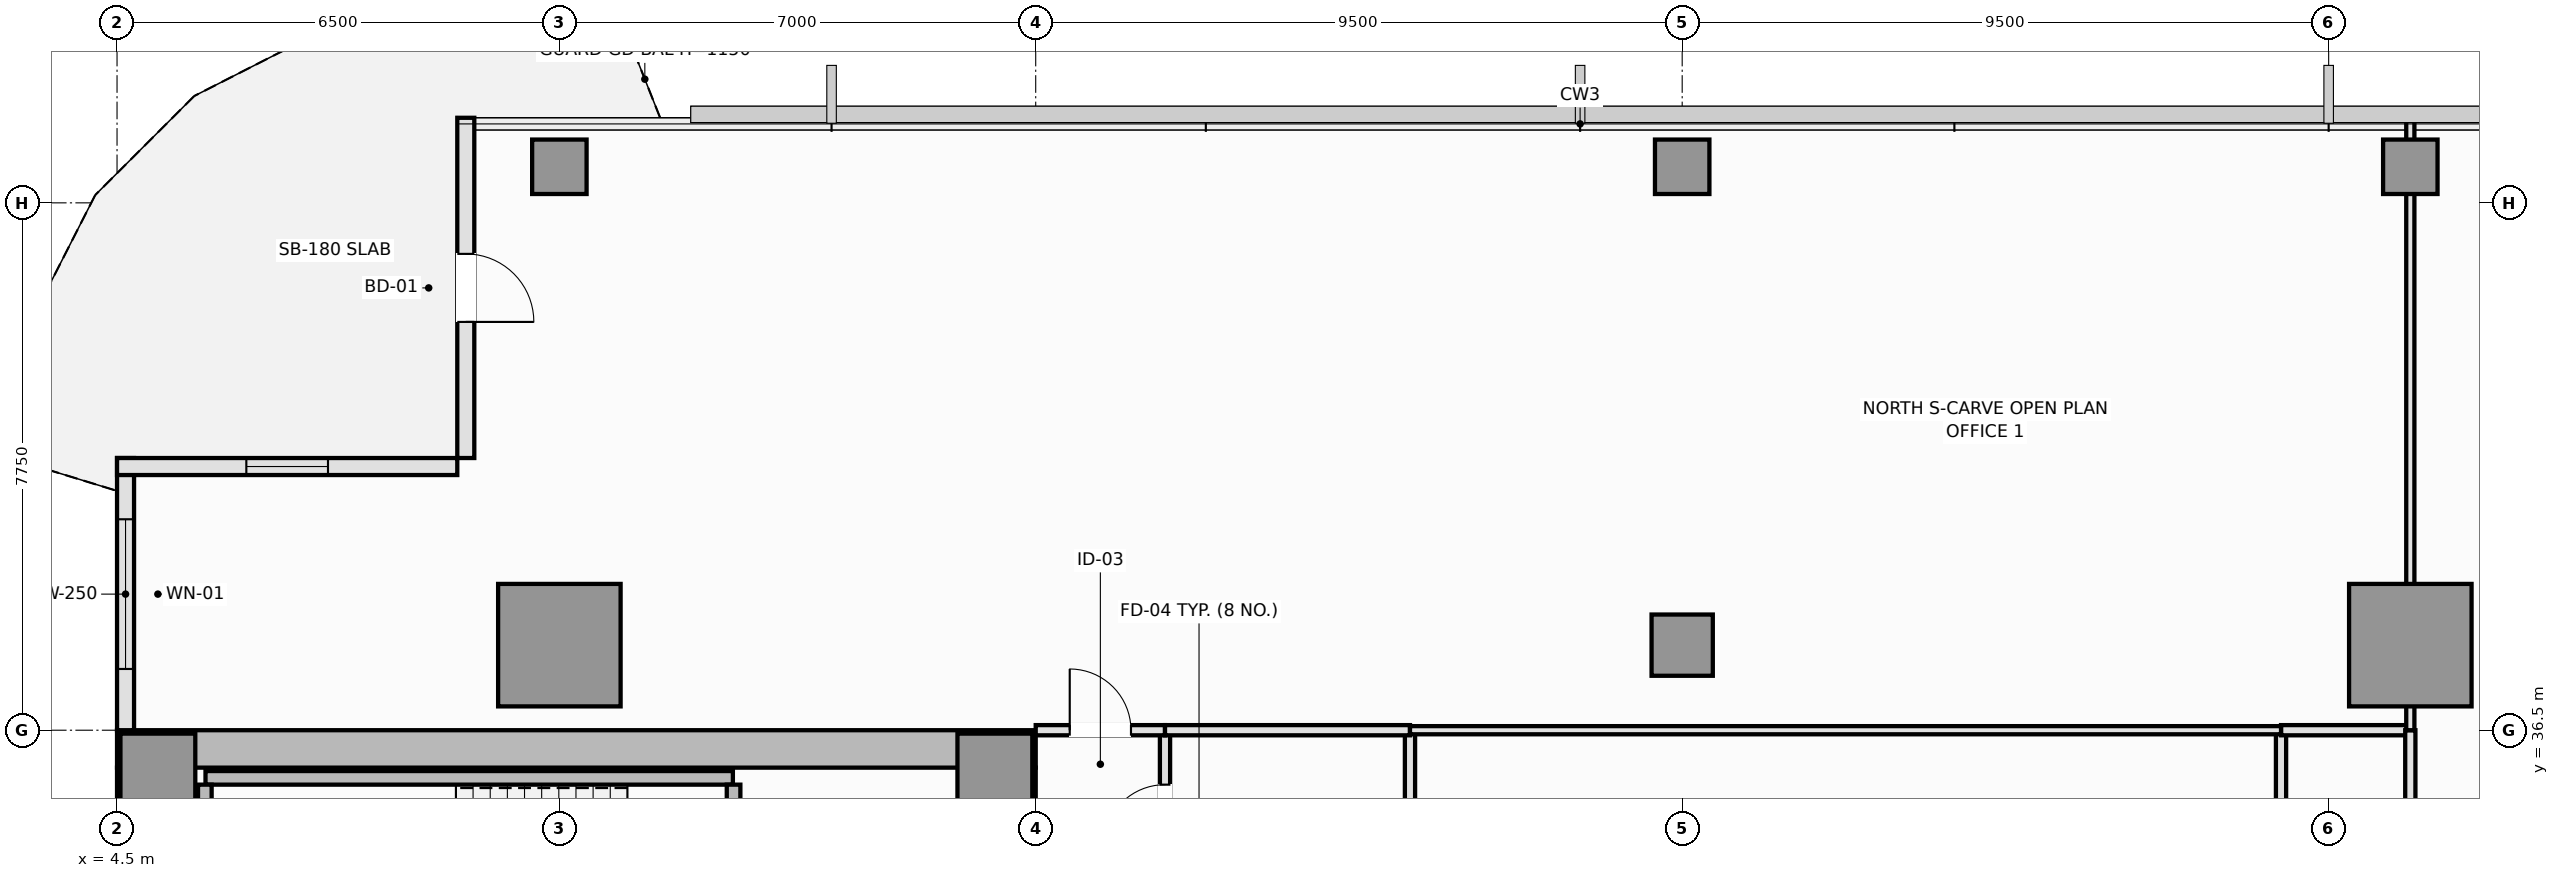
"""IFC4 building model, lengths in metres.
Left out: names, types, materials, properties, quantities, classifications, styles, units other than length and angle.
Written with IfcOpenShell. Run it as: python <this file> out.ifc"""

import sys

from ifc_helpers import new_model, si_unit, direction, frame, frame_2d, origin, origin_2d, place, context, subcontext, project, spatial, rectangle, extrude, element, fill, save


model = new_model("IFC4")
c1 = context("Model", 3, precision=1e-05, world=origin(), true_north=direction((0.0, 1.0)))
c2 = subcontext(c1, "Body", "Model", "MODEL_VIEW")
j1 = project(units=[si_unit("LENGTHUNIT", "METRE"), si_unit("PLANEANGLEUNIT", "RADIAN")], contexts=[c1])
p1 = place(None, origin())
s1 = spatial("IfcSite", under=j1, at=p1, CompositionType="ELEMENT")
p2 = place(p1, origin())
s2 = spatial("IfcBuilding", under=s1, at=p2, CompositionType="ELEMENT")
p3 = place(p2, frame((0.0, 0.0, 223.55)))
s3 = spatial("IfcBuildingStorey", under=s2, at=p3, CompositionType="ELEMENT", Elevation=223.55)
p4 = place(p3, frame((4.5, 36.225, 0.0), z_axis=(0.0, 0.0, 1.0), x_axis=(1.0, 0.0, 0.0)))
e1 = element("IfcWall", 1, at=p4, inside=s3, PredefinedType="SHEAR", context=c2, shape_type="SweptSolid", body=[
    extrude(rectangle(XDim=13.5, YDim=0.55, at=frame_2d((6.75, 0.0))), origin(), (0.0, 0.0, 1.0), 3.55),
])
p5 = place(p3, frame((4.775, 14.55, 0.0), z_axis=(0.0, 0.0, 1.0), x_axis=(0.0, 1.0, 0.0)))
e2 = element("IfcWall", 2, at=p5, inside=s3, PredefinedType="SHEAR", context=c2, shape_type="SweptSolid", body=[
    extrude(rectangle(XDim=21.4, YDim=0.55, at=frame_2d((10.7, 0.0))), origin(), (0.0, 0.0, 1.0), 3.55),
])
p6 = place(p3, frame((17.725, 27.05, 0.0), z_axis=(0.0, 0.0, 1.0), x_axis=(0.0, 1.0, 0.0)))
e3 = element("IfcWall", 3, at=p6, inside=s3, PredefinedType="SHEAR", context=c2, shape_type="SweptSolid", body=[
    extrude(rectangle(XDim=8.9, YDim=0.55, at=frame_2d((4.45, 0.0))), origin(), (0.0, 0.0, 1.0), 3.55),
])
p7 = place(p6, frame((3.45, 0.0, 0.0)))
e4 = element("IfcOpeningElement", 4, at=p7, cuts=e3, PredefinedType="OPENING", context=c2, shape_type="SweptSolid", body=[
    extrude(rectangle(XDim=1.1, YDim=2.15, at=frame_2d((0.55, 1.075))), frame((0.0, 0.285, 0.0), z_axis=(0.0, -1.0, 0.0), x_axis=(1.0, 0.0, 0.0)), (0.0, 0.0, 1.0), 0.57),
])
for number, where, z_axis, x_axis in (
    (5, (5.1, 35.9, 0.0), (0.0, 0.0, 1.0), (1.0, 0.0, 0.0)),
    (6, (17.4, 35.9, 0.0), (0.0, 0.0, 1.0), (1.0, 0.0, 0.0)),
):
    element("IfcColumn", number, at=place(p3, frame(where, z_axis=z_axis, x_axis=x_axis)), inside=s3, PredefinedType="PILASTER", context=c2, shape_type="SweptSolid", body=[
        extrude(rectangle(XDim=1.1, YDim=1.1, at=origin_2d()), origin(), (0.0, 0.0, 1.0), 3.55),
    ])
for number, where, z_axis, x_axis in (
    (7, (11.0, 37.75, 0.0), (0.0, 0.0, 1.0), (1.0, 0.0, 0.0)),
    (8, (38.2, 37.75, 0.0), (0.0, 0.0, 1.0), (1.0, 0.0, 0.0)),
):
    element("IfcColumn", number, at=place(p3, frame(where, z_axis=z_axis, x_axis=x_axis)), inside=s3, PredefinedType="COLUMN", context=c2, shape_type="SweptSolid", body=[
        extrude(rectangle(XDim=1.8, YDim=1.8, at=origin_2d()), origin(), (0.0, 0.0, 1.0), 3.55),
    ])
p8 = place(p3, frame((27.5, 37.75, 0.0), z_axis=(0.0, 0.0, 1.0), x_axis=(1.0, 0.0, 0.0)))
e9 = element("IfcColumn", 9, at=p8, inside=s3, PredefinedType="COLUMN", context=c2, shape_type="SweptSolid", body=[
    extrude(rectangle(XDim=0.9, YDim=0.9, at=origin_2d()), origin(), (0.0, 0.0, 1.0), 3.55),
])
for number, where, z_axis, x_axis in (
    (10, (11.0, 44.78, 0.0), (0.0, 0.0, 1.0), (1.0, 0.0, 0.0)),
    (11, (27.5, 44.78, 0.0), (0.0, 0.0, 1.0), (1.0, 0.0, 0.0)),
    (12, (38.2, 44.78, 0.0), (0.0, 0.0, 1.0), (1.0, 0.0, 0.0)),
):
    element("IfcColumn", number, at=place(p3, frame(where, z_axis=z_axis, x_axis=x_axis)), inside=s3, PredefinedType="COLUMN", context=c2, shape_type="SweptSolid", body=[
        extrude(rectangle(XDim=0.8, YDim=0.8, at=origin_2d()), origin(), (0.0, 0.0, 1.0), 3.55),
    ])
p9 = place(p3, frame((4.625, 40.5, 0.0), z_axis=(0.0, 0.0, 1.0), x_axis=(0.0, -1.0, 0.0)))
e13 = element("IfcWall", 13, at=p9, inside=s3, PredefinedType="SOLIDWALL", context=c2, shape_type="SweptSolid", body=[
    extrude(rectangle(XDim=4.0, YDim=0.25, at=frame_2d((2.0, 0.0))), origin(), (0.0, 0.0, 1.0), 3.37),
])
p10 = place(p9, frame((0.9, 0.0, 0.9)))
e14 = element("IfcOpeningElement", 14, at=p10, cuts=e13, PredefinedType="OPENING", context=c2, shape_type="SweptSolid", body=[
    extrude(rectangle(XDim=2.2, YDim=1.8, at=frame_2d((1.1, 0.9))), frame((0.0, 0.135, 0.0), z_axis=(0.0, -1.0, 0.0), x_axis=(1.0, 0.0, 0.0)), (0.0, 0.0, 1.0), 0.27),
])
p11 = place(p3, frame((9.625, 45.5, 0.0), z_axis=(0.0, 0.0, 1.0), x_axis=(0.0, -1.0, 0.0)))
e15 = element("IfcWall", 15, at=p11, inside=s3, PredefinedType="SOLIDWALL", context=c2, shape_type="SweptSolid", body=[
    extrude(rectangle(XDim=5.0, YDim=0.25, at=frame_2d((2.5, 0.0))), origin(), (0.0, 0.0, 1.0), 3.1),
])
p12 = place(p11, frame((2.0, 0.0, 0.0)))
e16 = element("IfcOpeningElement", 16, at=p12, cuts=e15, PredefinedType="OPENING", context=c2, shape_type="SweptSolid", body=[
    extrude(rectangle(XDim=1.0, YDim=2.2, at=frame_2d((0.5, 1.1))), frame((0.0, 0.135, 0.0), z_axis=(0.0, -1.0, 0.0), x_axis=(1.0, 0.0, 0.0)), (0.0, 0.0, 1.0), 0.27),
])
p13 = place(p3, frame((9.5, 40.375, 0.0), z_axis=(0.0, 0.0, 1.0), x_axis=(-1.0, 0.0, 0.0)))
e17 = element("IfcWall", 17, at=p13, inside=s3, PredefinedType="SOLIDWALL", context=c2, shape_type="SweptSolid", body=[
    extrude(rectangle(XDim=5.0, YDim=0.25, at=frame_2d((2.5, 0.0))), origin(), (0.0, 0.0, 1.0), 3.37),
])
p14 = place(p13, frame((1.9, 0.0, 0.9)))
e18 = element("IfcOpeningElement", 18, at=p14, cuts=e17, PredefinedType="OPENING", context=c2, shape_type="SweptSolid", body=[
    extrude(rectangle(XDim=1.2, YDim=1.8, at=frame_2d((0.6, 0.9))), frame((0.0, 0.135, 0.0), z_axis=(0.0, -1.0, 0.0), x_axis=(1.0, 0.0, 0.0)), (0.0, 0.0, 1.0), 0.27),
])
p15 = place(p3, frame((5.8, 35.8, 0.0), z_axis=(0.0, 0.0, 1.0), x_axis=(1.0, 0.0, 0.0)))
e19 = element("IfcWall", 19, at=p15, inside=s3, PredefinedType="SOLIDWALL", context=c2, shape_type="SweptSolid", body=[
    extrude(rectangle(XDim=7.75, YDim=0.2, at=frame_2d((3.875, 0.0))), origin(), (0.0, 0.0, 1.0), 3.55),
])
p16 = place(p3, frame((5.79, 32.65, 0.0), z_axis=(0.0, 0.0, 1.0), x_axis=(0.0, 1.0, 0.0)))
e20 = element("IfcWall", 20, at=p16, inside=s3, PredefinedType="SOLIDWALL", context=c2, shape_type="SweptSolid", body=[
    extrude(rectangle(XDim=3.05, YDim=0.2, at=frame_2d((1.525, 0.0))), origin(), (0.0, 0.0, 1.0), 3.55),
])
p17 = place(p3, frame((13.56, 32.65, 0.0), z_axis=(0.0, 0.0, 1.0), x_axis=(0.0, 1.0, 0.0)))
e21 = element("IfcWall", 21, at=p17, inside=s3, PredefinedType="SOLIDWALL", context=c2, shape_type="SweptSolid", body=[
    extrude(rectangle(XDim=3.05, YDim=0.2, at=frame_2d((1.525, 0.0))), origin(), (0.0, 0.0, 1.0), 3.55),
])
p18 = place(p17, frame((0.95, 0.0, 0.0)))
e22 = element("IfcOpeningElement", 22, at=p18, cuts=e21, PredefinedType="OPENING", context=c2, shape_type="SweptSolid", body=[
    extrude(rectangle(XDim=1.15, YDim=2.15, at=frame_2d((0.575, 1.075))), frame((0.0, 0.11, 0.0), z_axis=(0.0, -1.0, 0.0), x_axis=(1.0, 0.0, 0.0)), (0.0, 0.0, 1.0), 0.22),
])
p19 = place(p3, frame((19.9, 34.0, 0.0), z_axis=(0.0, 0.0, 1.0), x_axis=(0.0, 1.0, 0.0)))
e23 = element("IfcWall", 23, at=p19, inside=s3, PredefinedType="PLUMBINGWALL", context=c2, shape_type="SweptSolid", body=[
    extrude(rectangle(XDim=2.5, YDim=0.15, at=frame_2d((1.25, 0.0))), origin(), (0.0, 0.0, 1.0), 3.37),
])
p20 = place(p19, frame((0.8, 0.0, 0.0)))
e24 = element("IfcOpeningElement", 24, at=p20, cuts=e23, PredefinedType="OPENING", context=c2, shape_type="SweptSolid", body=[
    extrude(rectangle(XDim=0.9, YDim=2.1, at=frame_2d((0.45, 1.05))), frame((0.0, 0.085, 0.0), z_axis=(0.0, -1.0, 0.0), x_axis=(1.0, 0.0, 0.0)), (0.0, 0.0, 1.0), 0.17),
])
p21 = place(p3, frame((18.0, 36.5, 0.0), z_axis=(0.0, 0.0, 1.0), x_axis=(1.0, 0.0, 0.0)))
e25 = element("IfcWall", 25, at=p21, inside=s3, PredefinedType="PARTITIONING", context=c2, shape_type="SweptSolid", body=[
    extrude(rectangle(XDim=1.9, YDim=0.15, at=frame_2d((0.95, 0.0))), origin(), (0.0, 0.0, 1.0), 3.37),
])
p22 = place(p21, frame((0.5, 0.0, 0.0)))
e26 = element("IfcOpeningElement", 26, at=p22, cuts=e25, PredefinedType="OPENING", context=c2, shape_type="SweptSolid", body=[
    extrude(rectangle(XDim=0.9, YDim=2.1, at=frame_2d((0.45, 1.05))), frame((0.0, 0.085, 0.0), z_axis=(0.0, -1.0, 0.0), x_axis=(1.0, 0.0, 0.0)), (0.0, 0.0, 1.0), 0.17),
])
p23 = place(p3, frame((36.3, 32.7, 0.0), z_axis=(0.0, 0.0, 1.0), x_axis=(0.0, 1.0, 0.0)))
e27 = element("IfcWall", 27, at=p23, inside=s3, PredefinedType="PARTITIONING", context=c2, shape_type="SweptSolid", body=[
    extrude(rectangle(XDim=3.8, YDim=0.15, at=frame_2d((1.9, 0.0))), origin(), (0.0, 0.0, 1.0), 3.37),
])
p24 = place(p23, frame((1.4, 0.0, 0.0)))
e28 = element("IfcOpeningElement", 28, at=p24, cuts=e27, PredefinedType="OPENING", context=c2, shape_type="SweptSolid", body=[
    extrude(rectangle(XDim=1.0, YDim=2.15, at=frame_2d((0.5, 1.075))), frame((0.0, 0.085, 0.0), z_axis=(0.0, -1.0, 0.0), x_axis=(1.0, 0.0, 0.0)), (0.0, 0.0, 1.0), 0.17),
])
p25 = place(p3, frame((36.3, 36.5, 0.0), z_axis=(0.0, 0.0, 1.0), x_axis=(1.0, 0.0, 0.0)))
e29 = element("IfcWall", 29, at=p25, inside=s3, PredefinedType="PARTITIONING", context=c2, shape_type="SweptSolid", body=[
    extrude(rectangle(XDim=1.9, YDim=0.15, at=frame_2d((0.95, 0.0))), origin(), (0.0, 0.0, 1.0), 3.37),
])
p26 = place(p3, frame((38.2, 28.9, 0.0), z_axis=(0.0, 0.0, 1.0), x_axis=(0.0, 1.0, 0.0)))
e30 = element("IfcWall", 30, at=p26, inside=s3, PredefinedType="PARTITIONING", context=c2, shape_type="SweptSolid", body=[
    extrude(rectangle(XDim=7.6, YDim=0.15, at=frame_2d((3.8, 0.0))), origin(), (0.0, 0.0, 1.0), 2.92),
])
p27 = place(p26, frame((3.894, 0.0, 0.0)))
e31 = element("IfcOpeningElement", 31, at=p27, cuts=e30, PredefinedType="OPENING", context=c2, shape_type="SweptSolid", body=[
    extrude(rectangle(XDim=1.0, YDim=2.15, at=frame_2d((0.5, 1.075))), frame((0.0, 0.085, 0.0), z_axis=(0.0, -1.0, 0.0), x_axis=(1.0, 0.0, 0.0)), (0.0, 0.0, 1.0), 0.17),
])
p28 = place(p3, frame((23.5, 34.0, 0.0), z_axis=(0.0, 0.0, 1.0), x_axis=(0.0, 1.0, 0.0)))
e32 = element("IfcWall", 32, at=p28, inside=s3, PredefinedType="PLUMBINGWALL", context=c2, shape_type="SweptSolid", body=[
    extrude(rectangle(XDim=2.5, YDim=0.15, at=frame_2d((1.25, 0.0))), origin(), (0.0, 0.0, 1.0), 3.37),
])
p29 = place(p3, frame((19.9, 36.5, 0.0), z_axis=(0.0, 0.0, 1.0), x_axis=(1.0, 0.0, 0.0)))
e33 = element("IfcWall", 33, at=p29, inside=s3, PredefinedType="PLUMBINGWALL", context=c2, shape_type="SweptSolid", body=[
    extrude(rectangle(XDim=3.6, YDim=0.15, at=frame_2d((1.8, 0.0))), origin(), (0.0, 0.0, 1.0), 3.37),
])
p30 = place(p3, frame((23.5, 36.5, 0.0), z_axis=(0.0, 0.0, 1.0), x_axis=(1.0, 0.0, 0.0)))
e34 = element("IfcWall", 34, at=p30, inside=s3, PredefinedType="PARTITIONING", context=c2, shape_type="SweptSolid", body=[
    extrude(rectangle(XDim=12.8, YDim=0.12, at=frame_2d((6.4, 0.0))), origin(), (0.0, 0.0, 1.0), 3.37),
])
p31 = place(p3, frame((38.2, 36.5, 0.0), z_axis=(0.0, 0.0, 1.0), x_axis=(0.0, 1.0, 0.0)))
e35 = element("IfcWall", 35, at=p31, inside=s3, PredefinedType="PARTITIONING", context=c2, shape_type="SweptSolid", body=[
    extrude(rectangle(XDim=8.99, YDim=0.12, at=frame_2d((4.495, 0.0))), origin(), (0.0, 0.0, 1.0), 2.92),
])
p32 = place(p10, origin())
e36 = element("IfcWindow", 36, at=p32, inside=s3, PartitioningType="SINGLE_PANEL", PredefinedType="WINDOW", context=c2, shape_type="SweptSolid", body=[
    extrude(rectangle(XDim=2.2, YDim=1.8, at=frame_2d((1.1, 0.9))), frame((0.0, 0.03, 0.0), z_axis=(0.0, -1.0, 0.0), x_axis=(1.0, 0.0, 0.0)), (0.0, 0.0, 1.0), 0.06),
])
fill(e14, e36)
p33 = place(p12, frame((1.0, 0.0, 0.0), z_axis=(0.0, 0.0, 1.0), x_axis=(-1.0, 0.0, 0.0)))
e37 = element("IfcDoor", 37, at=p33, inside=s3, OperationType="SINGLE_SWING_RIGHT", PredefinedType="DOOR", context=c2, shape_type="SweptSolid", body=[
    extrude(rectangle(XDim=1.0, YDim=2.2, at=frame_2d((0.5, 1.1))), frame((0.0, 0.025, 0.0), z_axis=(0.0, -1.0, 0.0), x_axis=(1.0, 0.0, 0.0)), (0.0, 0.0, 1.0), 0.05),
])
fill(e16, e37)
p34 = place(p14, origin())
e38 = element("IfcWindow", 38, at=p34, inside=s3, PartitioningType="SINGLE_PANEL", PredefinedType="WINDOW", context=c2, shape_type="SweptSolid", body=[
    extrude(rectangle(XDim=1.2, YDim=1.8, at=frame_2d((0.6, 0.9))), frame((0.0, 0.03, 0.0), z_axis=(0.0, -1.0, 0.0), x_axis=(1.0, 0.0, 0.0)), (0.0, 0.0, 1.0), 0.06),
])
fill(e18, e38)
p35 = place(p20, origin())
e39 = element("IfcDoor", 39, at=p35, inside=s3, OperationType="SINGLE_SWING_LEFT", PredefinedType="DOOR", context=c2, shape_type="SweptSolid", body=[
    extrude(rectangle(XDim=0.9, YDim=2.1, at=frame_2d((0.45, 1.05))), frame((0.0, 0.025, 0.0), z_axis=(0.0, -1.0, 0.0), x_axis=(1.0, 0.0, 0.0)), (0.0, 0.0, 1.0), 0.05),
])
fill(e24, e39)
p36 = place(p22, origin())
e40 = element("IfcDoor", 40, at=p36, inside=s3, OperationType="SINGLE_SWING_LEFT", PredefinedType="DOOR", context=c2, shape_type="SweptSolid", body=[
    extrude(rectangle(XDim=0.9, YDim=2.1, at=frame_2d((0.45, 1.05))), frame((0.0, 0.025, 0.0), z_axis=(0.0, -1.0, 0.0), x_axis=(1.0, 0.0, 0.0)), (0.0, 0.0, 1.0), 0.05),
])
fill(e26, e40)
save(model, sys.argv[1])
